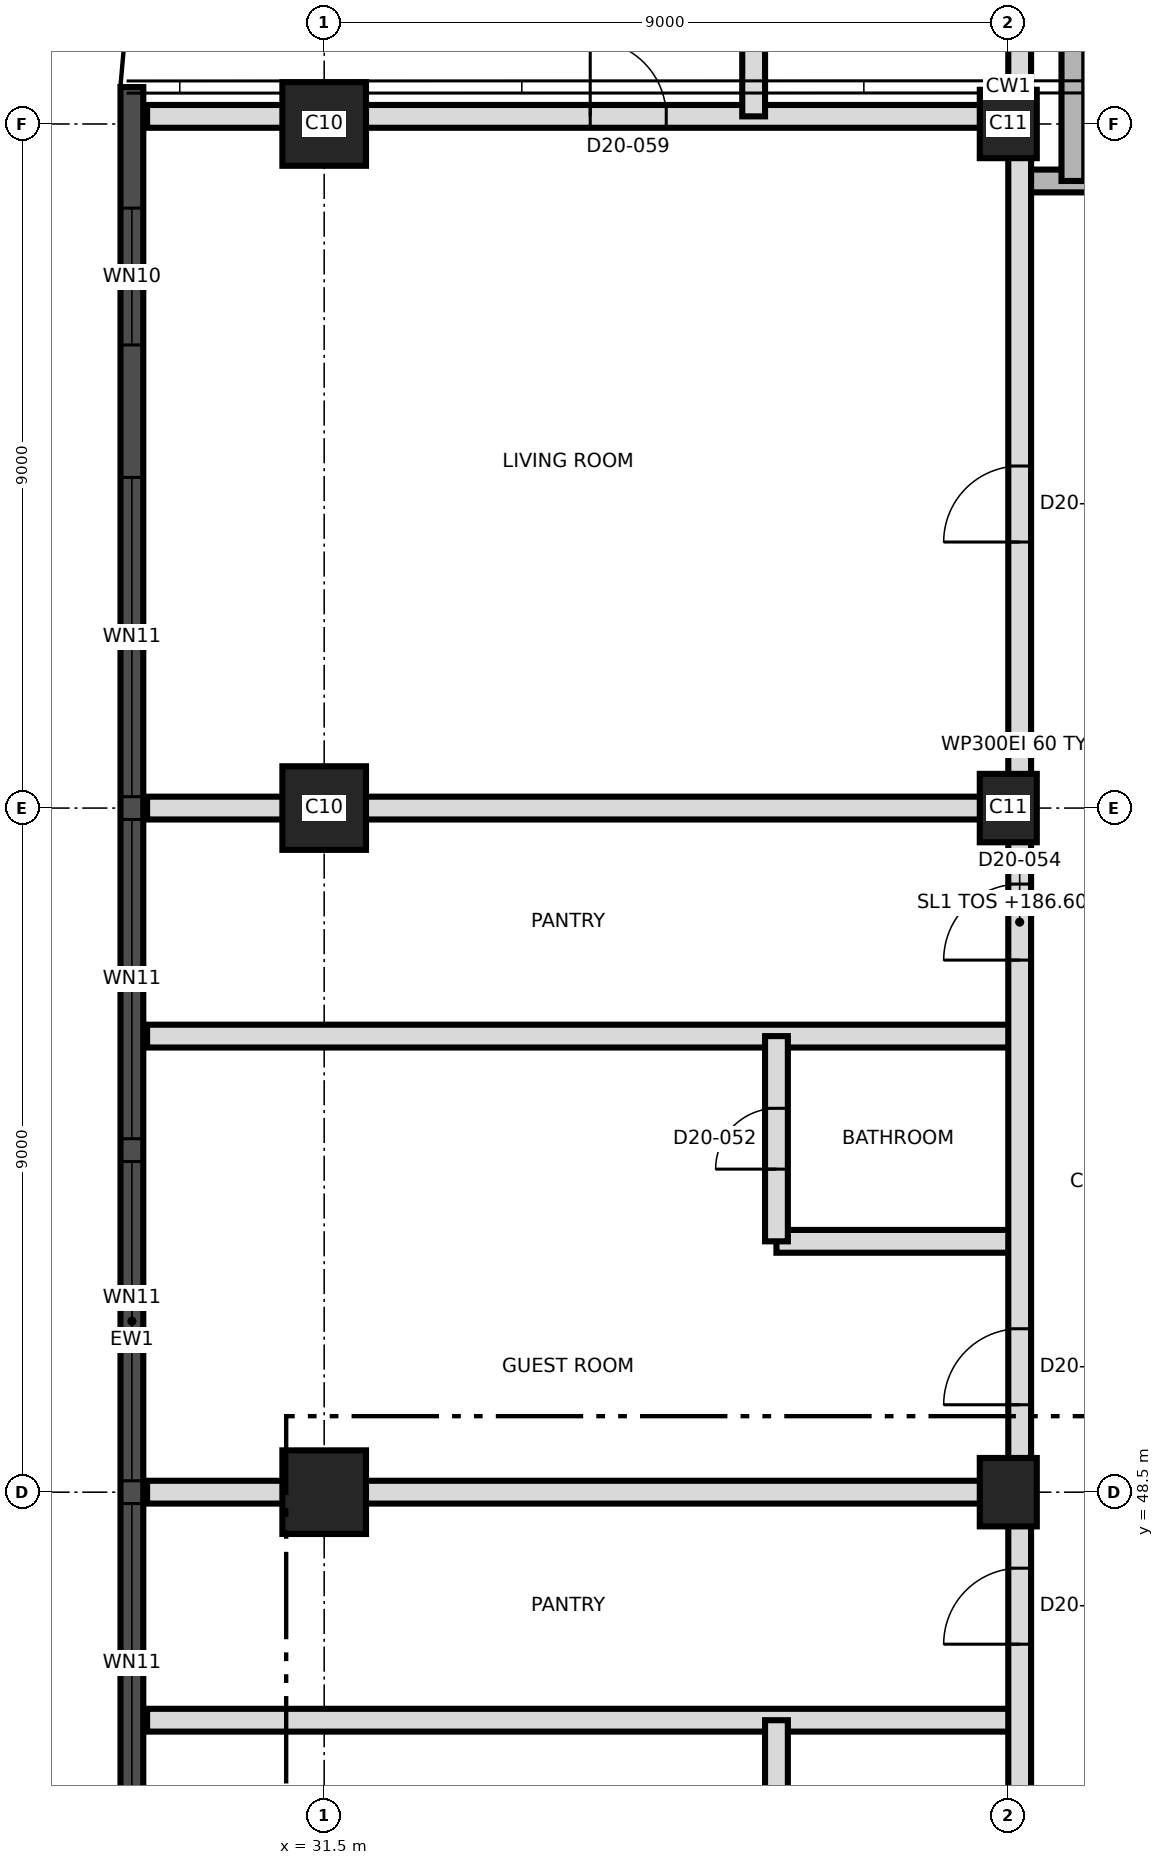
"""IFC4 building model, lengths in metres.
Left out: names, types, materials, properties, quantities, classifications, styles, units other than length and angle.
Written with IfcOpenShell. Run it as: python <this file> out.ifc"""

import sys

from ifc_helpers import new_model, si_unit, direction, frame, frame_2d, origin, origin_2d, place, context, subcontext, project, spatial, rectangle, extrude, element, fill, save


model = new_model("IFC4")
c1 = context("Model", 3, precision=1e-05, world=origin(), true_north=direction((0.0, 1.0)))
c2 = subcontext(c1, "Body", "Model", "MODEL_VIEW")
j1 = project(units=[si_unit("LENGTHUNIT", "METRE"), si_unit("PLANEANGLEUNIT", "RADIAN")], contexts=[c1])
p1 = place(None, origin())
s1 = spatial("IfcSite", under=j1, at=p1, CompositionType="ELEMENT")
p2 = place(p1, origin())
s2 = spatial("IfcBuilding", under=s1, at=p2, CompositionType="ELEMENT")
p3 = place(p2, frame((0.0, 0.0, 186.6)))
s3 = spatial("IfcBuildingStorey", under=s2, at=p3, CompositionType="ELEMENT", Elevation=186.6)
p4 = place(p3, frame((31.5, 48.5, 0.0), z_axis=(0.0, 0.0, 1.0), x_axis=(1.0, 0.0, 0.0)))
e1 = element("IfcColumn", 1, at=p4, inside=s3, PredefinedType="COLUMN", context=c2, shape_type="SweptSolid", body=[
    extrude(rectangle(XDim=1.1, YDim=1.1, at=origin_2d()), origin(), (0.0, 0.0, 1.0), 3.7),
])
p5 = place(p3, frame((40.5, 48.5, 0.0), z_axis=(0.0, 0.0, 1.0), x_axis=(0.0, 1.0, 0.0)))
e2 = element("IfcColumn", 2, at=p5, inside=s3, PredefinedType="COLUMN", context=c2, shape_type="SweptSolid", body=[
    extrude(rectangle(XDim=0.9, YDim=0.75, at=origin_2d()), origin(), (0.0, 0.0, 1.0), 3.7),
])
p6 = place(p3, frame((31.5, 57.5, 0.0), z_axis=(0.0, 0.0, 1.0), x_axis=(1.0, 0.0, 0.0)))
e3 = element("IfcColumn", 3, at=p6, inside=s3, PredefinedType="COLUMN", context=c2, shape_type="SweptSolid", body=[
    extrude(rectangle(XDim=1.1, YDim=1.1, at=origin_2d()), origin(), (0.0, 0.0, 1.0), 3.7),
])
p7 = place(p3, frame((40.5, 57.5, 0.0), z_axis=(0.0, 0.0, 1.0), x_axis=(0.0, 1.0, 0.0)))
e4 = element("IfcColumn", 4, at=p7, inside=s3, PredefinedType="COLUMN", context=c2, shape_type="SweptSolid", body=[
    extrude(rectangle(XDim=0.9, YDim=0.75, at=origin_2d()), origin(), (0.0, 0.0, 1.0), 3.7),
])
p8 = place(p3, frame((31.5, 66.5, 0.0), z_axis=(0.0, 0.0, 1.0), x_axis=(1.0, 0.0, 0.0)))
e5 = element("IfcColumn", 5, at=p8, inside=s3, PredefinedType="COLUMN", context=c2, shape_type="SweptSolid", body=[
    extrude(rectangle(XDim=1.1, YDim=1.1, at=origin_2d()), origin(), (0.0, 0.0, 1.0), 3.7),
])
p9 = place(p3, frame((40.5, 66.5, 0.0), z_axis=(0.0, 0.0, 1.0), x_axis=(0.0, 1.0, 0.0)))
e6 = element("IfcColumn", 6, at=p9, inside=s3, PredefinedType="COLUMN", context=c2, shape_type="SweptSolid", body=[
    extrude(rectangle(XDim=0.9, YDim=0.75, at=origin_2d()), origin(), (0.0, 0.0, 1.0), 3.7),
])
p10 = place(p3, frame((28.97, 66.986, 0.0), z_axis=(0.0, 0.0, 1.0), x_axis=(0.0, -1.0, 0.0)))
e7 = element("IfcWall", 7, at=p10, inside=s3, PredefinedType="SOLIDWALL", context=c2, shape_type="SweptSolid", body=[
    extrude(rectangle(XDim=32.976, YDim=0.3, at=frame_2d((16.488, 0.0))), origin(), (0.0, 0.0, 1.0), 3.4),
])
p11 = place(p10, frame((1.593, 0.0, 0.3)))
e8 = element("IfcOpeningElement", 8, at=p11, cuts=e7, PredefinedType="OPENING", context=c2, shape_type="SweptSolid", body=[
    extrude(rectangle(XDim=1.8, YDim=2.4, at=frame_2d((0.9, 1.2))), frame((0.0, 0.16, 0.0), z_axis=(0.0, -1.0, 0.0), x_axis=(1.0, 0.0, 0.0)), (0.0, 0.0, 1.0), 0.32),
])
p12 = place(p10, frame((5.136, 0.0, 0.9)))
e9 = element("IfcOpeningElement", 9, at=p12, cuts=e7, PredefinedType="OPENING", context=c2, shape_type="SweptSolid", body=[
    extrude(rectangle(XDim=4.2, YDim=1.5, at=frame_2d((2.1, 0.75))), frame((0.0, 0.16, 0.0), z_axis=(0.0, -1.0, 0.0), x_axis=(1.0, 0.0, 0.0)), (0.0, 0.0, 1.0), 0.32),
])
p13 = place(p10, frame((9.636, 0.0, 0.9)))
e10 = element("IfcOpeningElement", 10, at=p13, cuts=e7, PredefinedType="OPENING", context=c2, shape_type="SweptSolid", body=[
    extrude(rectangle(XDim=4.2, YDim=1.5, at=frame_2d((2.1, 0.75))), frame((0.0, 0.16, 0.0), z_axis=(0.0, -1.0, 0.0), x_axis=(1.0, 0.0, 0.0)), (0.0, 0.0, 1.0), 0.32),
])
p14 = place(p10, frame((14.136, 0.0, 0.9)))
e11 = element("IfcOpeningElement", 11, at=p14, cuts=e7, PredefinedType="OPENING", context=c2, shape_type="SweptSolid", body=[
    extrude(rectangle(XDim=4.2, YDim=1.5, at=frame_2d((2.1, 0.75))), frame((0.0, 0.16, 0.0), z_axis=(0.0, -1.0, 0.0), x_axis=(1.0, 0.0, 0.0)), (0.0, 0.0, 1.0), 0.32),
])
p15 = place(p10, frame((18.636, 0.0, 0.9)))
e12 = element("IfcOpeningElement", 12, at=p15, cuts=e7, PredefinedType="OPENING", context=c2, shape_type="SweptSolid", body=[
    extrude(rectangle(XDim=4.2, YDim=1.5, at=frame_2d((2.1, 0.75))), frame((0.0, 0.16, 0.0), z_axis=(0.0, -1.0, 0.0), x_axis=(1.0, 0.0, 0.0)), (0.0, 0.0, 1.0), 0.32),
])
p16 = place(p10, frame((23.136, 0.0, 0.9)))
e13 = element("IfcOpeningElement", 13, at=p16, cuts=e7, PredefinedType="OPENING", context=c2, shape_type="SweptSolid", body=[
    extrude(rectangle(XDim=4.2, YDim=1.5, at=frame_2d((2.1, 0.75))), frame((0.0, 0.16, 0.0), z_axis=(0.0, -1.0, 0.0), x_axis=(1.0, 0.0, 0.0)), (0.0, 0.0, 1.0), 0.32),
])
p17 = place(p10, frame((29.331, 0.0, 0.3)))
e14 = element("IfcOpeningElement", 14, at=p17, cuts=e7, PredefinedType="OPENING", context=c2, shape_type="SweptSolid", body=[
    extrude(rectangle(XDim=1.8, YDim=2.4, at=frame_2d((0.9, 1.2))), frame((0.0, 0.16, 0.0), z_axis=(0.0, -1.0, 0.0), x_axis=(1.0, 0.0, 0.0)), (0.0, 0.0, 1.0), 0.32),
])
for number, where, z_axis, x_axis in (
    (15, (29.17, 45.5, 0.0), (0.0, 0.0, 1.0), (1.0, 0.0, 0.0)),
    (16, (29.17, 48.5, 0.0), (0.0, 0.0, 1.0), (1.0, 0.0, 0.0)),
):
    element("IfcWall", number, at=place(p3, frame(where, z_axis=z_axis, x_axis=x_axis)), inside=s3, PredefinedType="PARTITIONING", context=c2, shape_type="SweptSolid", body=[
        extrude(rectangle(XDim=11.48, YDim=0.3, at=frame_2d((5.74, 0.0))), origin(), (0.0, 0.0, 1.0), 3.35),
    ])
p18 = place(p3, frame((37.45, 51.8, 0.0), z_axis=(0.0, 0.0, 1.0), x_axis=(1.0, 0.0, 0.0)))
e17 = element("IfcWall", 17, at=p18, inside=s3, PredefinedType="PARTITIONING", context=c2, shape_type="SweptSolid", body=[
    extrude(rectangle(XDim=3.2, YDim=0.3, at=frame_2d((1.6, 0.0))), origin(), (0.0, 0.0, 1.0), 3.4),
])
for number, where, z_axis, x_axis in (
    (18, (29.17, 54.5, 0.0), (0.0, 0.0, 1.0), (1.0, 0.0, 0.0)),
    (19, (29.17, 57.5, 0.0), (0.0, 0.0, 1.0), (1.0, 0.0, 0.0)),
):
    element("IfcWall", number, at=place(p3, frame(where, z_axis=z_axis, x_axis=x_axis)), inside=s3, PredefinedType="PARTITIONING", context=c2, shape_type="SweptSolid", body=[
        extrude(rectangle(XDim=11.48, YDim=0.3, at=frame_2d((5.74, 0.0))), origin(), (0.0, 0.0, 1.0), 3.35),
    ])
p19 = place(p3, frame((40.65, 65.75, 0.0), z_axis=(0.0, 0.0, 1.0), x_axis=(1.0, 0.0, 0.0)))
e20 = element("IfcWall", 20, at=p19, inside=s3, PredefinedType="SHEAR", context=c2, shape_type="SweptSolid", body=[
    extrude(rectangle(XDim=2.87, YDim=0.3, at=frame_2d((1.435, 0.0))), origin(), (0.0, 0.0, 1.0), 3.35),
])
p20 = place(p19, frame((1.1, 0.0, 0.0)))
e21 = element("IfcOpeningElement", 21, at=p20, cuts=e20, PredefinedType="OPENING", context=c2, shape_type="SweptSolid", body=[
    extrude(rectangle(XDim=1.2, YDim=2.1, at=frame_2d((0.6, 1.05))), frame((0.0, 0.16, 0.0), z_axis=(0.0, -1.0, 0.0), x_axis=(1.0, 0.0, 0.0)), (0.0, 0.0, 1.0), 0.32),
])
p21 = place(p3, frame((29.17, 66.6, 0.0), z_axis=(0.0, 0.0, 1.0), x_axis=(1.0, 0.0, 0.0)))
e22 = element("IfcWall", 22, at=p21, inside=s3, PredefinedType="PARTITIONING", context=c2, shape_type="SweptSolid", body=[
    extrude(rectangle(XDim=11.48, YDim=0.3, at=frame_2d((5.74, 0.0))), origin(), (0.0, 0.0, 1.0), 3.35),
])
p22 = place(p21, frame((5.83, 0.0, 0.0)))
e23 = element("IfcOpeningElement", 23, at=p22, cuts=e22, PredefinedType="OPENING", context=c2, shape_type="SweptSolid", body=[
    extrude(rectangle(XDim=1.0, YDim=2.1, at=frame_2d((0.5, 1.05))), frame((0.0, 0.16, 0.0), z_axis=(0.0, -1.0, 0.0), x_axis=(1.0, 0.0, 0.0)), (0.0, 0.0, 1.0), 0.32),
])
p23 = place(p3, frame((37.15, 66.6, 0.0), z_axis=(0.0, 0.0, 1.0), x_axis=(0.0, 1.0, 0.0)))
e24 = element("IfcWall", 24, at=p23, inside=s3, PredefinedType="PARTITIONING", context=c2, shape_type="SweptSolid", body=[
    extrude(rectangle(XDim=3.3, YDim=0.3, at=frame_2d((1.65, 0.0))), origin(), (0.0, 0.0, 1.0), 3.35),
])
p24 = place(p23, frame((1.25, 0.0, 0.0)))
e25 = element("IfcOpeningElement", 25, at=p24, cuts=e24, PredefinedType="OPENING", context=c2, shape_type="SweptSolid", body=[
    extrude(rectangle(XDim=0.8, YDim=2.1, at=frame_2d((0.4, 1.05))), frame((0.0, 0.16, 0.0), z_axis=(0.0, -1.0, 0.0), x_axis=(1.0, 0.0, 0.0)), (0.0, 0.0, 1.0), 0.32),
])
p25 = place(p3, frame((37.45, 42.8, 0.0), z_axis=(0.0, 0.0, 1.0), x_axis=(0.0, 1.0, 0.0)))
e26 = element("IfcWall", 26, at=p25, inside=s3, PredefinedType="PARTITIONING", context=c2, shape_type="SweptSolid", body=[
    extrude(rectangle(XDim=2.7, YDim=0.3, at=frame_2d((1.35, 0.0))), origin(), (0.0, 0.0, 1.0), 3.4),
])
p26 = place(p25, frame((0.95, 0.0, 0.0)))
e27 = element("IfcOpeningElement", 27, at=p26, cuts=e26, PredefinedType="OPENING", context=c2, shape_type="SweptSolid", body=[
    extrude(rectangle(XDim=0.8, YDim=2.1, at=frame_2d((0.4, 1.05))), frame((0.0, 0.16, 0.0), z_axis=(0.0, -1.0, 0.0), x_axis=(1.0, 0.0, 0.0)), (0.0, 0.0, 1.0), 0.32),
])
p27 = place(p3, frame((37.45, 51.8, 0.0), z_axis=(0.0, 0.0, 1.0), x_axis=(0.0, 1.0, 0.0)))
e28 = element("IfcWall", 28, at=p27, inside=s3, PredefinedType="PARTITIONING", context=c2, shape_type="SweptSolid", body=[
    extrude(rectangle(XDim=2.7, YDim=0.3, at=frame_2d((1.35, 0.0))), origin(), (0.0, 0.0, 1.0), 3.4),
])
p28 = place(p27, frame((0.95, 0.0, 0.0)))
e29 = element("IfcOpeningElement", 29, at=p28, cuts=e28, PredefinedType="OPENING", context=c2, shape_type="SweptSolid", body=[
    extrude(rectangle(XDim=0.8, YDim=2.1, at=frame_2d((0.4, 1.05))), frame((0.0, 0.16, 0.0), z_axis=(0.0, -1.0, 0.0), x_axis=(1.0, 0.0, 0.0)), (0.0, 0.0, 1.0), 0.32),
])
p29 = place(p3, frame((40.65, 39.65, 0.0), z_axis=(0.0, 0.0, 1.0), x_axis=(0.0, 1.0, 0.0)))
e30 = element("IfcWall", 30, at=p29, inside=s3, PredefinedType="PARTITIONING", context=c2, shape_type="SweptSolid", body=[
    extrude(rectangle(XDim=37.35, YDim=0.3, at=frame_2d((18.675, 0.0))), origin(), (0.0, 0.0, 1.0), 3.35),
])
p30 = place(p29, frame((1.0, 0.0, 0.0)))
e31 = element("IfcOpeningElement", 31, at=p30, cuts=e30, PredefinedType="OPENING", context=c2, shape_type="SweptSolid", body=[
    extrude(rectangle(XDim=1.0, YDim=2.1, at=frame_2d((0.5, 1.05))), frame((0.0, 0.16, 0.0), z_axis=(0.0, -1.0, 0.0), x_axis=(1.0, 0.0, 0.0)), (0.0, 0.0, 1.0), 0.32),
])
p31 = place(p29, frame((6.85, 0.0, 0.0)))
e32 = element("IfcOpeningElement", 32, at=p31, cuts=e30, PredefinedType="OPENING", context=c2, shape_type="SweptSolid", body=[
    extrude(rectangle(XDim=1.0, YDim=2.1, at=frame_2d((0.5, 1.05))), frame((0.0, 0.16, 0.0), z_axis=(0.0, -1.0, 0.0), x_axis=(1.0, 0.0, 0.0)), (0.0, 0.0, 1.0), 0.32),
])
p32 = place(p29, frame((10.0, 0.0, 0.0)))
e33 = element("IfcOpeningElement", 33, at=p32, cuts=e30, PredefinedType="OPENING", context=c2, shape_type="SweptSolid", body=[
    extrude(rectangle(XDim=1.0, YDim=2.1, at=frame_2d((0.5, 1.05))), frame((0.0, 0.16, 0.0), z_axis=(0.0, -1.0, 0.0), x_axis=(1.0, 0.0, 0.0)), (0.0, 0.0, 1.0), 0.32),
])
p33 = place(p29, frame((15.85, 0.0, 0.0)))
e34 = element("IfcOpeningElement", 34, at=p33, cuts=e30, PredefinedType="OPENING", context=c2, shape_type="SweptSolid", body=[
    extrude(rectangle(XDim=1.0, YDim=2.1, at=frame_2d((0.5, 1.05))), frame((0.0, 0.16, 0.0), z_axis=(0.0, -1.0, 0.0), x_axis=(1.0, 0.0, 0.0)), (0.0, 0.0, 1.0), 0.32),
])
p34 = place(p29, frame((21.35, 0.0, 0.0)))
e35 = element("IfcOpeningElement", 35, at=p34, cuts=e30, PredefinedType="OPENING", context=c2, shape_type="SweptSolid", body=[
    extrude(rectangle(XDim=1.0, YDim=2.1, at=frame_2d((0.5, 1.05))), frame((0.0, 0.16, 0.0), z_axis=(0.0, -1.0, 0.0), x_axis=(1.0, 0.0, 0.0)), (0.0, 0.0, 1.0), 0.32),
])
p35 = place(p3, frame((41.35, 65.75, 0.0), z_axis=(0.0, 0.0, 1.0), x_axis=(0.0, 1.0, 0.0)))
e36 = element("IfcWall", 36, at=p35, inside=s3, PredefinedType="SHEAR", context=c2, shape_type="SweptSolid", body=[
    extrude(rectangle(XDim=8.85, YDim=0.3, at=frame_2d((4.425, 0.0))), origin(), (0.0, 0.0, 1.0), 3.35),
])
p36 = place(p11, origin())
e37 = element("IfcWindow", 37, at=p36, inside=s3, PartitioningType="SINGLE_PANEL", PredefinedType="WINDOW", context=c2, shape_type="SweptSolid", body=[
    extrude(rectangle(XDim=1.8, YDim=2.4, at=frame_2d((0.9, 1.2))), frame((0.0, 0.03, 0.0), z_axis=(0.0, -1.0, 0.0), x_axis=(1.0, 0.0, 0.0)), (0.0, 0.0, 1.0), 0.06),
])
fill(e8, e37)
p37 = place(p12, origin())
e38 = element("IfcWindow", 38, at=p37, inside=s3, PartitioningType="SINGLE_PANEL", PredefinedType="WINDOW", context=c2, shape_type="SweptSolid", body=[
    extrude(rectangle(XDim=4.2, YDim=1.5, at=frame_2d((2.1, 0.75))), frame((0.0, 0.03, 0.0), z_axis=(0.0, -1.0, 0.0), x_axis=(1.0, 0.0, 0.0)), (0.0, 0.0, 1.0), 0.06),
])
fill(e9, e38)
p38 = place(p13, origin())
e39 = element("IfcWindow", 39, at=p38, inside=s3, PartitioningType="SINGLE_PANEL", PredefinedType="WINDOW", context=c2, shape_type="SweptSolid", body=[
    extrude(rectangle(XDim=4.2, YDim=1.5, at=frame_2d((2.1, 0.75))), frame((0.0, 0.03, 0.0), z_axis=(0.0, -1.0, 0.0), x_axis=(1.0, 0.0, 0.0)), (0.0, 0.0, 1.0), 0.06),
])
fill(e10, e39)
p39 = place(p14, origin())
e40 = element("IfcWindow", 40, at=p39, inside=s3, PartitioningType="SINGLE_PANEL", PredefinedType="WINDOW", context=c2, shape_type="SweptSolid", body=[
    extrude(rectangle(XDim=4.2, YDim=1.5, at=frame_2d((2.1, 0.75))), frame((0.0, 0.03, 0.0), z_axis=(0.0, -1.0, 0.0), x_axis=(1.0, 0.0, 0.0)), (0.0, 0.0, 1.0), 0.06),
])
fill(e11, e40)
p40 = place(p15, origin())
e41 = element("IfcWindow", 41, at=p40, inside=s3, PartitioningType="SINGLE_PANEL", PredefinedType="WINDOW", context=c2, shape_type="SweptSolid", body=[
    extrude(rectangle(XDim=4.2, YDim=1.5, at=frame_2d((2.1, 0.75))), frame((0.0, 0.03, 0.0), z_axis=(0.0, -1.0, 0.0), x_axis=(1.0, 0.0, 0.0)), (0.0, 0.0, 1.0), 0.06),
])
fill(e12, e41)
p41 = place(p31, origin())
e42 = element("IfcDoor", 42, at=p41, inside=s3, OperationType="SINGLE_SWING_LEFT", PredefinedType="DOOR", context=c2, shape_type="SweptSolid", body=[
    extrude(rectangle(XDim=1.0, YDim=2.1, at=frame_2d((0.5, 1.05))), frame((0.0, 0.025, 0.0), z_axis=(0.0, -1.0, 0.0), x_axis=(1.0, 0.0, 0.0)), (0.0, 0.0, 1.0), 0.05),
])
fill(e32, e42)
p42 = place(p28, origin())
e43 = element("IfcDoor", 43, at=p42, inside=s3, OperationType="SINGLE_SWING_RIGHT", PredefinedType="DOOR", context=c2, shape_type="SweptSolid", body=[
    extrude(rectangle(XDim=0.8, YDim=2.1, at=frame_2d((0.4, 1.05))), frame((0.0, 0.025, 0.0), z_axis=(0.0, -1.0, 0.0), x_axis=(1.0, 0.0, 0.0)), (0.0, 0.0, 1.0), 0.05),
])
fill(e29, e43)
p43 = place(p32, origin())
e44 = element("IfcDoor", 44, at=p43, inside=s3, OperationType="SINGLE_SWING_LEFT", PredefinedType="DOOR", context=c2, shape_type="SweptSolid", body=[
    extrude(rectangle(XDim=1.0, YDim=2.1, at=frame_2d((0.5, 1.05))), frame((0.0, 0.025, 0.0), z_axis=(0.0, -1.0, 0.0), x_axis=(1.0, 0.0, 0.0)), (0.0, 0.0, 1.0), 0.05),
])
fill(e33, e44)
p44 = place(p33, origin())
e45 = element("IfcDoor", 45, at=p44, inside=s3, OperationType="SINGLE_SWING_LEFT", PredefinedType="DOOR", context=c2, shape_type="SweptSolid", body=[
    extrude(rectangle(XDim=1.0, YDim=2.1, at=frame_2d((0.5, 1.05))), frame((0.0, 0.025, 0.0), z_axis=(0.0, -1.0, 0.0), x_axis=(1.0, 0.0, 0.0)), (0.0, 0.0, 1.0), 0.05),
])
fill(e34, e45)
p45 = place(p34, origin())
e46 = element("IfcDoor", 46, at=p45, inside=s3, OperationType="SINGLE_SWING_LEFT", PredefinedType="DOOR", context=c2, shape_type="SweptSolid", body=[
    extrude(rectangle(XDim=1.0, YDim=2.1, at=frame_2d((0.5, 1.05))), frame((0.0, 0.025, 0.0), z_axis=(0.0, -1.0, 0.0), x_axis=(1.0, 0.0, 0.0)), (0.0, 0.0, 1.0), 0.05),
])
fill(e35, e46)
p46 = place(p22, origin())
e47 = element("IfcDoor", 47, at=p46, inside=s3, OperationType="SINGLE_SWING_RIGHT", PredefinedType="DOOR", context=c2, shape_type="SweptSolid", body=[
    extrude(rectangle(XDim=1.0, YDim=2.1, at=frame_2d((0.5, 1.05))), frame((0.0, 0.025, 0.0), z_axis=(0.0, -1.0, 0.0), x_axis=(1.0, 0.0, 0.0)), (0.0, 0.0, 1.0), 0.05),
])
fill(e23, e47)
save(model, sys.argv[1])
